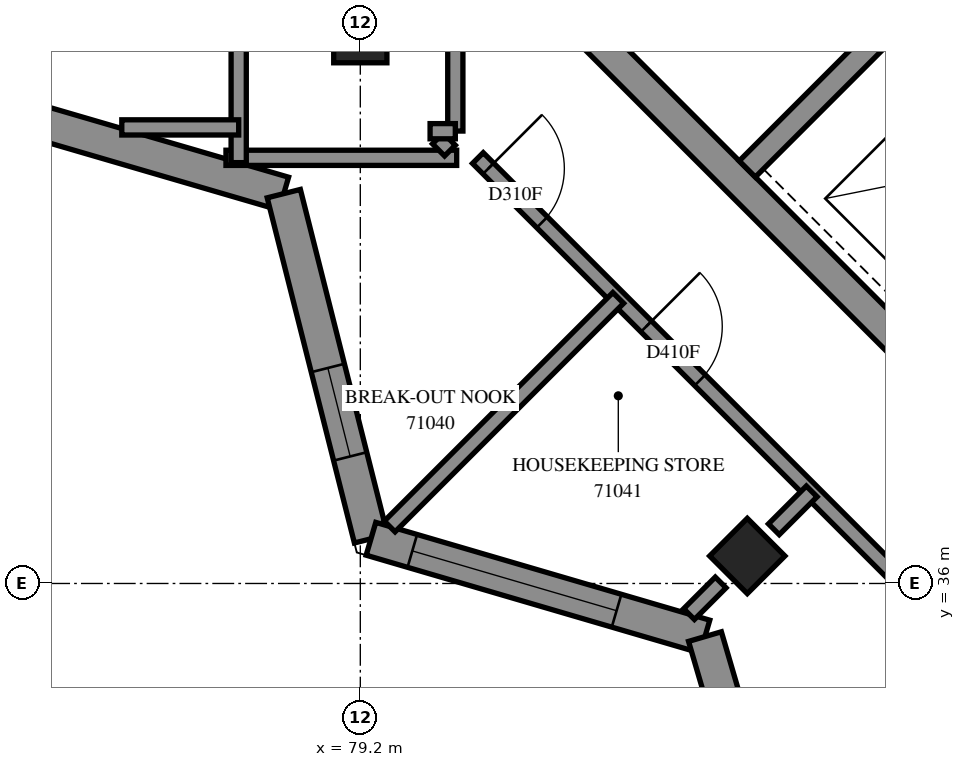
"""IFC4 building model, lengths in metres.
Left out: names, types, materials, properties, quantities, classifications, styles, units other than length and angle.
Written with IfcOpenShell. Run it as: python <this file> out.ifc"""

import sys

from ifc_helpers import new_model, si_unit, direction, frame, frame_2d, origin, origin_2d, place, context, subcontext, project, spatial, polyline, rectangle, outline, extrude, element, fill, save


model = new_model("IFC4")
c1 = context("Model", 3, precision=1e-05, world=origin(), true_north=direction((0.0, 1.0)))
c2 = subcontext(c1, "Body", "Model", "MODEL_VIEW")
j1 = project(units=[si_unit("LENGTHUNIT", "METRE"), si_unit("PLANEANGLEUNIT", "RADIAN")], contexts=[c1])
p1 = place(None, origin())
s1 = spatial("IfcSite", under=j1, at=p1, CompositionType="ELEMENT")
p2 = place(p1, origin())
s2 = spatial("IfcBuilding", under=s1, at=p2, CompositionType="ELEMENT")
p3 = place(p2, frame((0.0, 0.0, 260.8)))
s3 = spatial("IfcBuildingStorey", under=s2, at=p3, CompositionType="ELEMENT", Elevation=260.8)
for number, where, z_axis, x_axis in (
    (1, (79.2, 43.2, 0.0), (0.0, 0.0, 1.0), (1.0, 0.0, 0.0)),
    (2, (84.291, 36.362, 0.0), (0.0, 0.0, 1.0), (0.707, -0.707, 0.0)),
):
    element("IfcColumn", number, at=place(p3, frame(where, z_axis=z_axis, x_axis=x_axis)), inside=s3, PredefinedType="COLUMN", context=c2, shape_type="SweptSolid", body=[
        extrude(rectangle(XDim=0.7, YDim=0.7, at=origin_2d()), origin(), (0.0, 0.0, 1.0), 3.1),
    ])
p4 = place(p3, frame((76.23, 49.231, -0.3), z_axis=(0.0, 0.0, 1.0), x_axis=(0.7071034917, -0.7071100706, 0.0)))
e3 = element("IfcWall", 3, at=p4, inside=s3, PredefinedType="SHEAR", context=c2, shape_type="SweptSolid", body=[
    extrude(rectangle(XDim=15.2, YDim=0.4, at=frame_2d((7.6, 0.0))), origin(), (0.0, 0.0, 1.0), 2.7),
])
p5 = place(p3, frame((84.291, 41.453, 0.0), z_axis=(0.0, 0.0, 1.0), x_axis=(0.7071067812, 0.7071067812, 0.0)))
e4 = element("IfcWall", 4, at=p5, inside=s3, PredefinedType="SOLIDWALL", context=c2, shape_type="SweptSolid", body=[
    extrude(rectangle(XDim=3.3, YDim=0.3, at=frame_2d((1.65, 0.0))), origin(), (0.0, 0.0, 1.0), 3.1),
])
p6 = place(p3, frame((78.988, 51.423, 0.0), z_axis=(0.0, 0.0, 1.0), x_axis=(0.7071067812, -0.7071067812, 0.0)))
e5 = element("IfcWall", 5, at=p6, inside=s3, PredefinedType="SOLIDWALL", context=c2, shape_type="SweptSolid", body=[
    extrude(rectangle(XDim=14.4, YDim=0.3, at=frame_2d((7.2, 0.0))), origin(), (0.0, 0.0, 1.0), 3.1),
])
p7 = place(p6, frame((1.35, 0.0, 0.0)))
e6 = element("IfcOpeningElement", 6, at=p7, cuts=e5, PredefinedType="OPENING", context=c2, shape_type="SweptSolid", body=[
    extrude(rectangle(XDim=0.9, YDim=2.1, at=frame_2d((0.45, 1.05))), frame((0.0, 0.16, 0.0), z_axis=(0.0, -1.0, 0.0), x_axis=(1.0, 0.0, 0.0)), (0.0, 0.0, 1.0), 0.32),
])
p8 = place(p6, frame((4.95, 0.0, 0.0)))
e7 = element("IfcOpeningElement", 7, at=p8, cuts=e5, PredefinedType="OPENING", context=c2, shape_type="SweptSolid", body=[
    extrude(rectangle(XDim=0.9, YDim=2.1, at=frame_2d((0.45, 1.05))), frame((0.0, 0.16, 0.0), z_axis=(0.0, -1.0, 0.0), x_axis=(1.0, 0.0, 0.0)), (0.0, 0.0, 1.0), 0.32),
])
p9 = place(p6, frame((8.55, 0.0, 0.0)))
e8 = element("IfcOpeningElement", 8, at=p9, cuts=e5, PredefinedType="OPENING", context=c2, shape_type="SweptSolid", body=[
    extrude(rectangle(XDim=0.9, YDim=2.1, at=frame_2d((0.45, 1.05))), frame((0.0, 0.16, 0.0), z_axis=(0.0, -1.0, 0.0), x_axis=(1.0, 0.0, 0.0)), (0.0, 0.0, 1.0), 0.32),
])
p10 = place(p6, frame((12.05, 0.0, 0.0)))
e9 = element("IfcOpeningElement", 9, at=p10, cuts=e5, PredefinedType="OPENING", context=c2, shape_type="SweptSolid", body=[
    extrude(rectangle(XDim=1.1, YDim=2.1, at=frame_2d((0.55, 1.05))), frame((0.0, 0.16, 0.0), z_axis=(0.0, -1.0, 0.0), x_axis=(1.0, 0.0, 0.0)), (0.0, 0.0, 1.0), 0.32),
])
p11 = place(p3, frame((74.424, 42.229, 0.0), z_axis=(0.0, 0.0, 1.0), x_axis=(0.9599486399, -0.2801760317, 0.0)))
e10 = element("IfcWall", 10, at=p11, inside=s3, PredefinedType="SOLIDWALL", context=c2, shape_type="SweptSolid", body=[
    extrude(outline(polyline([(0.047, -0.225), (3.798, -0.225), (4.055, 0.225), (-0.047, 0.225), (0.047, -0.225)])), origin(), (0.0, 0.0, 1.0), 3.1),
])
p12 = place(p3, frame((78.194, 41.129, 0.0), z_axis=(0.0, 0.0, 1.0), x_axis=(0.2448760065, -0.9695544036, 0.0)))
e11 = element("IfcWall", 11, at=p12, inside=s3, PredefinedType="SOLIDWALL", context=c2, shape_type="SweptSolid", body=[
    extrude(outline(polyline([(0.129, -0.225), (4.812, -0.225), (4.555, 0.225), (-0.129, 0.225), (0.129, -0.225)])), origin(), (0.0, 0.0, 1.0), 3.1),
])
p13 = place(p12, frame((2.366, 0.0, 0.45)))
e12 = element("IfcOpeningElement", 12, at=p13, cuts=e11, PredefinedType="OPENING", context=c2, shape_type="SweptSolid", body=[
    extrude(rectangle(XDim=1.2, YDim=2.55, at=frame_2d((0.6, 1.275))), frame((0.0, 0.235, 0.0), z_axis=(0.0, -1.0, 0.0), x_axis=(1.0, 0.0, 0.0)), (0.0, 0.0, 1.0), 0.47),
])
p14 = place(p3, frame((79.34, 36.588, 0.0), z_axis=(0.0, 0.0, 1.0), x_axis=(0.9597007783, -0.281023871, 0.0)))
e13 = element("IfcWall", 13, at=p14, inside=s3, PredefinedType="SOLIDWALL", context=c2, shape_type="SweptSolid", body=[
    extrude(outline(polyline([(-0.129, -0.225), (4.456, -0.225), (4.702, 0.225), (0.129, 0.225), (-0.129, -0.225)])), origin(), (0.0, 0.0, 1.0), 3.1),
])
p15 = place(p14, frame((0.567, 0.0, 0.45)))
e14 = element("IfcOpeningElement", 14, at=p15, cuts=e13, PredefinedType="OPENING", context=c2, shape_type="SweptSolid", body=[
    extrude(rectangle(XDim=2.8, YDim=2.55, at=frame_2d((1.4, 1.275))), frame((0.0, 0.235, 0.0), z_axis=(0.0, -1.0, 0.0), x_axis=(1.0, 0.0, 0.0)), (0.0, 0.0, 1.0), 0.47),
])
p16 = place(p3, frame((83.734, 35.301, 0.0), z_axis=(0.0, 0.0, 1.0), x_axis=(0.281023871, -0.9597007783, 0.0)))
e15 = element("IfcWall", 15, at=p16, inside=s3, PredefinedType="SOLIDWALL", context=c2, shape_type="SweptSolid", body=[
    extrude(outline(polyline([(0.123, -0.225), (4.707, -0.225), (4.45, 0.225), (-0.123, 0.225), (0.123, -0.225)])), origin(), (0.0, 0.0, 1.0), 3.1),
])
p17 = place(p16, frame((1.012, 0.0, 0.45)))
e16 = element("IfcOpeningElement", 16, at=p17, cuts=e15, PredefinedType="OPENING", context=c2, shape_type="SweptSolid", body=[
    extrude(rectangle(XDim=1.2, YDim=2.55, at=frame_2d((0.6, 1.275))), frame((0.0, 0.235, 0.0), z_axis=(0.0, -1.0, 0.0), x_axis=(1.0, 0.0, 0.0)), (0.0, 0.0, 1.0), 0.47),
])
p18 = place(p3, frame((84.954, 31.938, 0.0), z_axis=(0.0, 0.0, 1.0), x_axis=(0.7071769042, 0.7070366512, 0.0)))
e17 = element("IfcWall", 17, at=p18, inside=s3, PredefinedType="PARTITIONING", context=c2, shape_type="SweptSolid", body=[
    extrude(rectangle(XDim=14.26, YDim=0.2, at=frame_2d((7.13, 0.0))), origin(), (0.0, 0.0, 1.0), 3.1),
])
p19 = place(p3, frame((80.747, 41.597, 0.0), z_axis=(0.0, 0.0, 1.0), x_axis=(0.7071067812, -0.7071067812, 0.0)))
e18 = element("IfcWall", 18, at=p19, inside=s3, PredefinedType="PARTITIONING", context=c2, shape_type="SweptSolid", body=[
    extrude(rectangle(XDim=8.607, YDim=0.2, at=frame_2d((4.303, 0.0))), origin(), (0.0, 0.0, 1.0), 3.1),
])
p20 = place(p19, frame((0.195, 0.0, 0.0)))
e19 = element("IfcOpeningElement", 19, at=p20, cuts=e18, PredefinedType="OPENING", context=c2, shape_type="SweptSolid", body=[
    extrude(rectangle(XDim=1.0, YDim=2.1, at=frame_2d((0.5, 1.05))), frame((0.0, 0.11, 0.0), z_axis=(0.0, -1.0, 0.0), x_axis=(1.0, 0.0, 0.0)), (0.0, 0.0, 1.0), 0.22),
])
p21 = place(p19, frame((3.133, 0.0, 0.0)))
e20 = element("IfcOpeningElement", 20, at=p21, cuts=e18, PredefinedType="OPENING", context=c2, shape_type="SweptSolid", body=[
    extrude(rectangle(XDim=1.0, YDim=2.1, at=frame_2d((0.5, 1.05))), frame((0.0, 0.11, 0.0), z_axis=(0.0, -1.0, 0.0), x_axis=(1.0, 0.0, 0.0)), (0.0, 0.0, 1.0), 0.22),
])
p22 = place(p3, frame((79.587, 36.75, 0.0), z_axis=(0.0, 0.0, 1.0), x_axis=(0.7071185405, 0.7070950217, 0.0)))
e21 = element("IfcWall", 21, at=p22, inside=s3, PredefinedType="PARTITIONING", context=c2, shape_type="SweptSolid", body=[
    extrude(rectangle(XDim=4.252, YDim=0.2, at=frame_2d((2.126, 0.0))), origin(), (0.0, 0.0, 1.0), 3.1),
])
p23 = place(p3, frame((77.433, 41.6, 0.0), z_axis=(0.0, 0.0, 1.0), x_axis=(1.0, 0.0, 0.0)))
e22 = element("IfcWall", 22, at=p23, inside=s3, PredefinedType="PARTITIONING", context=c2, shape_type="SweptSolid", body=[
    extrude(rectangle(XDim=3.035, YDim=0.2, at=frame_2d((1.518, 0.0))), origin(), (0.0, 0.0, 1.0), 3.1),
])
p24 = place(p3, frame((77.6, 41.536, 0.0), z_axis=(0.0, 0.0, 1.0), x_axis=(0.0, 1.0, 0.0)))
e23 = element("IfcWall", 23, at=p24, inside=s3, PredefinedType="PARTITIONING", context=c2, shape_type="SweptSolid", body=[
    extrude(rectangle(XDim=2.932, YDim=0.2, at=frame_2d((1.466, 0.0))), origin(), (0.0, 0.0, 1.0), 3.1),
])
p25 = place(p3, frame((80.45, 41.952, 0.0), z_axis=(0.0, 0.0, 1.0), x_axis=(0.0, 1.0, 0.0)))
e24 = element("IfcWall", 24, at=p25, inside=s3, PredefinedType="PARTITIONING", context=c2, shape_type="SweptSolid", body=[
    extrude(rectangle(XDim=2.498, YDim=0.2, at=frame_2d((1.249, 0.0))), origin(), (0.0, 0.0, 1.0), 3.1),
])
p26 = place(p3, frame((76.062, 42.0, 0.0), z_axis=(0.0, 0.0, 1.0), x_axis=(1.0, 0.0, 0.0)))
e25 = element("IfcWall", 25, at=p26, inside=s3, PredefinedType="PARTITIONING", context=c2, shape_type="SweptSolid", body=[
    extrude(rectangle(XDim=1.538, YDim=0.2, at=frame_2d((0.769, 0.0))), origin(), (0.0, 0.0, 1.0), 3.1),
])
p27 = place(p3, frame((84.641, 36.713, 0.0), z_axis=(0.0, 0.0, 1.0), x_axis=(0.7071067812, 0.7071067812, 0.0)))
e26 = element("IfcWall", 26, at=p27, inside=s3, PredefinedType="PARTITIONING", context=c2, shape_type="SweptSolid", body=[
    extrude(rectangle(XDim=0.704, YDim=0.2, at=frame_2d((0.352, 0.0))), origin(), (0.0, 0.0, 1.0), 3.1),
])
p28 = place(p3, frame((83.525, 35.597, 0.0), z_axis=(0.0, 0.0, 1.0), x_axis=(0.7070217975, 0.7071917547, 0.0)))
e27 = element("IfcWall", 27, at=p28, inside=s3, PredefinedType="PARTITIONING", context=c2, shape_type="SweptSolid", body=[
    extrude(rectangle(XDim=0.588, YDim=0.2, at=frame_2d((0.294, 0.0))), origin(), (0.0, 0.0, 1.0), 3.1),
])
p29 = place(p3, frame((80.221, 41.855, 0.0), z_axis=(0.0, 0.0, 1.0), x_axis=(0.7068844555, -0.707329037, 0.0)))
e28 = element("IfcWall", 28, at=p29, inside=s3, PredefinedType="PARTITIONING", context=c2, shape_type="SweptSolid", body=[
    extrude(rectangle(XDim=0.225, YDim=0.2, at=frame_2d((0.112, 0.0))), origin(), (0.0, 0.0, 1.0), 3.1),
])
p30 = place(p3, frame((80.118, 41.95, 0.0), z_axis=(0.0, 0.0, 1.0), x_axis=(1.0, 0.0, 0.0)))
e29 = element("IfcWall", 29, at=p30, inside=s3, PredefinedType="PARTITIONING", context=c2, shape_type="SweptSolid", body=[
    extrude(rectangle(XDim=0.332, YDim=0.2, at=frame_2d((0.166, 0.0))), origin(), (0.0, 0.0, 1.0), 3.1),
])
p31 = place(p13, origin())
e30 = element("IfcWindow", 30, at=p31, inside=s3, PartitioningType="SINGLE_PANEL", PredefinedType="WINDOW", context=c2, shape_type="SweptSolid", body=[
    extrude(rectangle(XDim=1.2, YDim=2.55, at=frame_2d((0.6, 1.275))), frame((0.0, 0.205, 0.0), z_axis=(0.0, -1.0, 0.0), x_axis=(1.0, 0.0, 0.0)), (0.0, 0.0, 1.0), 0.06),
])
fill(e12, e30)
p32 = place(p15, origin())
e31 = element("IfcWindow", 31, at=p32, inside=s3, PartitioningType="SINGLE_PANEL", PredefinedType="WINDOW", context=c2, shape_type="SweptSolid", body=[
    extrude(rectangle(XDim=2.8, YDim=2.55, at=frame_2d((1.4, 1.275))), frame((0.0, 0.205, 0.0), z_axis=(0.0, -1.0, 0.0), x_axis=(1.0, 0.0, 0.0)), (0.0, 0.0, 1.0), 0.06),
])
fill(e14, e31)
p33 = place(p20, origin())
e32 = element("IfcDoor", 32, at=p33, inside=s3, OperationType="SINGLE_SWING_LEFT", PredefinedType="DOOR", context=c2, shape_type="SweptSolid", body=[
    extrude(rectangle(XDim=1.0, YDim=2.1, at=frame_2d((0.5, 1.05))), frame((0.0, 0.025, 0.0), z_axis=(0.0, -1.0, 0.0), x_axis=(1.0, 0.0, 0.0)), (0.0, 0.0, 1.0), 0.05),
])
fill(e19, e32)
p34 = place(p21, origin())
e33 = element("IfcDoor", 33, at=p34, inside=s3, OperationType="SINGLE_SWING_LEFT", PredefinedType="DOOR", context=c2, shape_type="SweptSolid", body=[
    extrude(rectangle(XDim=1.0, YDim=2.1, at=frame_2d((0.5, 1.05))), frame((0.0, 0.025, 0.0), z_axis=(0.0, -1.0, 0.0), x_axis=(1.0, 0.0, 0.0)), (0.0, 0.0, 1.0), 0.05),
])
fill(e20, e33)
save(model, sys.argv[1])
